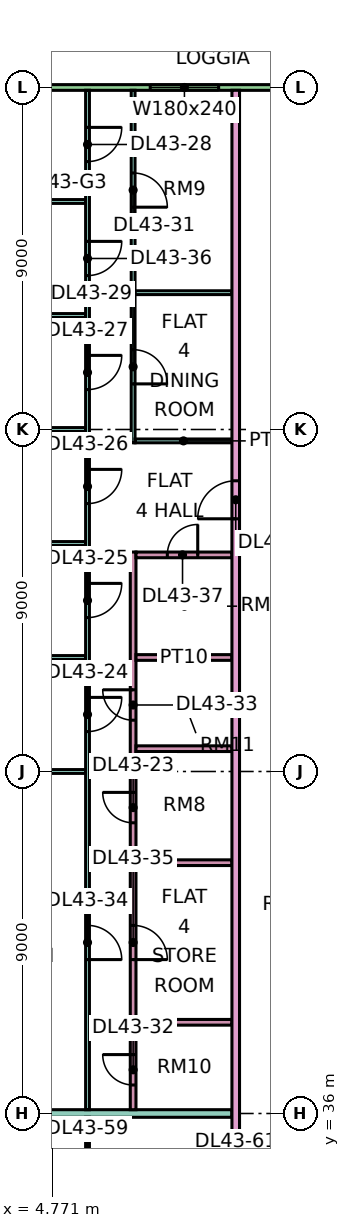
"""IFC4 building model, lengths in metres.
Left out: names, types, materials, properties, quantities, classifications, styles, units other than length and angle.
Written with IfcOpenShell. Run it as: python <this file> out.ifc"""

import sys

from ifc_helpers import new_model, si_unit, direction, frame, frame_2d, origin, place, context, subcontext, project, spatial, rectangle, extrude, element, fill, save


model = new_model("IFC4")
c1 = context("Model", 3, precision=1e-05, world=origin(), true_north=direction((0.0, 1.0)))
c2 = subcontext(c1, "Body", "Model", "MODEL_VIEW")
j1 = project(units=[si_unit("LENGTHUNIT", "METRE"), si_unit("PLANEANGLEUNIT", "RADIAN")], contexts=[c1])
p1 = place(None, origin())
s1 = spatial("IfcSite", under=j1, at=p1, CompositionType="ELEMENT")
p2 = place(p1, origin())
s2 = spatial("IfcBuilding", under=s1, at=p2, CompositionType="ELEMENT")
p3 = place(p2, frame((0.0, 0.0, 187.4)))
s3 = spatial("IfcBuildingStorey", under=s2, at=p3, CompositionType="ELEMENT", Elevation=187.4)
p4 = place(p3, frame((11.925, 63.0, 0.0), z_axis=(0.0, 0.0, 1.0), x_axis=(-1.0, 0.0, 0.0)))
e1 = element("IfcWall", 1, at=p4, inside=s3, PredefinedType="SOLIDWALL", context=c2, shape_type="SweptSolid", body=[
    extrude(rectangle(XDim=10.35, YDim=0.15, at=frame_2d((5.175, 0.0))), origin(), (0.0, 0.0, 1.0), 3.35),
])
p5 = place(p4, frame((2.775, 0.0, 0.45)))
e2 = element("IfcOpeningElement", 2, at=p5, cuts=e1, PredefinedType="OPENING", context=c2, shape_type="SweptSolid", body=[
    extrude(rectangle(XDim=1.8, YDim=2.4, at=frame_2d((0.9, 1.2))), frame((0.0, 0.085, 0.0), z_axis=(0.0, -1.0, 0.0), x_axis=(1.0, 0.0, 0.0)), (0.0, 0.0, 1.0), 0.17),
])
p6 = place(p4, frame((7.387, 0.0, 0.0)))
e3 = element("IfcOpeningElement", 3, at=p6, cuts=e1, PredefinedType="OPENING", context=c2, shape_type="SweptSolid", body=[
    extrude(rectangle(XDim=1.8, YDim=2.4, at=frame_2d((0.9, 1.2))), frame((0.0, 0.085, 0.0), z_axis=(0.0, -1.0, 0.0), x_axis=(1.0, 0.0, 0.0)), (0.0, 0.0, 1.0), 0.17),
])
p7 = place(p3, frame((0.0, 36.0, 0.0), z_axis=(0.0, 0.0, 1.0), x_axis=(1.0, 0.0, 0.0)))
e4 = element("IfcWall", 4, at=p7, inside=s3, PredefinedType="PARTITIONING", context=c2, shape_type="SweptSolid", body=[
    extrude(rectangle(XDim=9.5, YDim=0.2, at=frame_2d((4.75, 0.0))), origin(), (0.0, 0.0, 1.0), 3.35),
])
p8 = place(p3, frame((0.0, 45.0, 0.0), z_axis=(0.0, 0.0, 1.0), x_axis=(1.0, 0.0, 0.0)))
e5 = element("IfcWall", 5, at=p8, inside=s3, PredefinedType="PARTITIONING", context=c2, shape_type="SweptSolid", body=[
    extrude(rectangle(XDim=5.65, YDim=0.1, at=frame_2d((2.825, 0.0))), origin(), (0.0, 0.0, 1.0), 3.35),
])
p9 = place(p3, frame((0.0, 48.0, 0.0), z_axis=(0.0, 0.0, 1.0), x_axis=(1.0, 0.0, 0.0)))
e6 = element("IfcWall", 6, at=p9, inside=s3, PredefinedType="PARTITIONING", context=c2, shape_type="SweptSolid", body=[
    extrude(rectangle(XDim=5.65, YDim=0.1, at=frame_2d((2.825, 0.0))), origin(), (0.0, 0.0, 1.0), 3.35),
])
for number, where, z_axis, x_axis in (
    (7, (0.074, 51.0, 0.0), (0.0, 0.0, 1.0), (1.0, 0.0, 0.0)),
    (8, (0.074, 54.0, 0.0), (0.0, 0.0, 1.0), (1.0, 0.0, 0.0)),
    (9, (0.074, 57.0, 0.0), (0.0, 0.0, 1.0), (1.0, 0.0, 0.0)),
    (10, (0.074, 60.0, 0.0), (0.0, 0.0, 1.0), (1.0, 0.0, 0.0)),
):
    element("IfcWall", number, at=place(p3, frame(where, z_axis=z_axis, x_axis=x_axis)), inside=s3, PredefinedType="PARTITIONING", context=c2, shape_type="SweptSolid", body=[
        extrude(rectangle(XDim=5.576, YDim=0.1, at=frame_2d((2.788, 0.0))), origin(), (0.0, 0.0, 1.0), 3.35),
    ])
p10 = place(p3, frame((5.7, 29.95, 0.0), z_axis=(0.0, 0.0, 1.0), x_axis=(0.0, 1.0, 0.0)))
e11 = element("IfcWall", 11, at=p10, inside=s3, PredefinedType="PARTITIONING", context=c2, shape_type="SweptSolid", body=[
    extrude(rectangle(XDim=5.95, YDim=0.1, at=frame_2d((2.975, 0.0))), origin(), (0.0, 0.0, 1.0), 3.35),
])
p11 = place(p10, frame((1.1, 0.0, 0.0)))
e12 = element("IfcOpeningElement", 12, at=p11, cuts=e11, PredefinedType="OPENING", context=c2, shape_type="SweptSolid", body=[
    extrude(rectangle(XDim=0.9, YDim=2.1, at=frame_2d((0.45, 1.05))), frame((0.0, 0.06, 0.0), z_axis=(0.0, -1.0, 0.0), x_axis=(1.0, 0.0, 0.0)), (0.0, 0.0, 1.0), 0.12),
])
p12 = place(p10, frame((4.1, 0.0, 0.0)))
e13 = element("IfcOpeningElement", 13, at=p12, cuts=e11, PredefinedType="OPENING", context=c2, shape_type="SweptSolid", body=[
    extrude(rectangle(XDim=0.9, YDim=2.1, at=frame_2d((0.45, 1.05))), frame((0.0, 0.06, 0.0), z_axis=(0.0, -1.0, 0.0), x_axis=(1.0, 0.0, 0.0)), (0.0, 0.0, 1.0), 0.12),
])
p13 = place(p3, frame((5.7, 36.1, 0.0), z_axis=(0.0, 0.0, 1.0), x_axis=(0.0, 1.0, 0.0)))
e14 = element("IfcWall", 14, at=p13, inside=s3, PredefinedType="PARTITIONING", context=c2, shape_type="SweptSolid", body=[
    extrude(rectangle(XDim=26.826, YDim=0.1, at=frame_2d((13.413, 0.0))), origin(), (0.0, 0.0, 1.0), 3.35),
])
p14 = place(p13, frame((9.95, 0.0, 0.0)))
e15 = element("IfcOpeningElement", 15, at=p14, cuts=e14, PredefinedType="OPENING", context=c2, shape_type="SweptSolid", body=[
    extrude(rectangle(XDim=0.9, YDim=2.1, at=frame_2d((0.45, 1.05))), frame((0.0, 0.06, 0.0), z_axis=(0.0, -1.0, 0.0), x_axis=(1.0, 0.0, 0.0)), (0.0, 0.0, 1.0), 0.12),
])
p15 = place(p13, frame((12.95, 0.0, 0.0)))
e16 = element("IfcOpeningElement", 16, at=p15, cuts=e14, PredefinedType="OPENING", context=c2, shape_type="SweptSolid", body=[
    extrude(rectangle(XDim=0.9, YDim=2.1, at=frame_2d((0.45, 1.05))), frame((0.0, 0.06, 0.0), z_axis=(0.0, -1.0, 0.0), x_axis=(1.0, 0.0, 0.0)), (0.0, 0.0, 1.0), 0.12),
])
p16 = place(p13, frame((15.95, 0.0, 0.0)))
e17 = element("IfcOpeningElement", 17, at=p16, cuts=e14, PredefinedType="OPENING", context=c2, shape_type="SweptSolid", body=[
    extrude(rectangle(XDim=0.9, YDim=2.1, at=frame_2d((0.45, 1.05))), frame((0.0, 0.06, 0.0), z_axis=(0.0, -1.0, 0.0), x_axis=(1.0, 0.0, 0.0)), (0.0, 0.0, 1.0), 0.12),
])
p17 = place(p13, frame((18.95, 0.0, 0.0)))
e18 = element("IfcOpeningElement", 18, at=p17, cuts=e14, PredefinedType="OPENING", context=c2, shape_type="SweptSolid", body=[
    extrude(rectangle(XDim=0.9, YDim=2.1, at=frame_2d((0.45, 1.05))), frame((0.0, 0.06, 0.0), z_axis=(0.0, -1.0, 0.0), x_axis=(1.0, 0.0, 0.0)), (0.0, 0.0, 1.0), 0.12),
])
p18 = place(p13, frame((24.95, 0.0, 0.0)))
e19 = element("IfcOpeningElement", 19, at=p18, cuts=e14, PredefinedType="OPENING", context=c2, shape_type="SweptSolid", body=[
    extrude(rectangle(XDim=0.9, YDim=2.1, at=frame_2d((0.45, 1.05))), frame((0.0, 0.06, 0.0), z_axis=(0.0, -1.0, 0.0), x_axis=(1.0, 0.0, 0.0)), (0.0, 0.0, 1.0), 0.12),
])
p19 = place(p13, frame((3.95, 0.0, 0.0)))
e20 = element("IfcOpeningElement", 20, at=p19, cuts=e14, PredefinedType="OPENING", context=c2, shape_type="SweptSolid", body=[
    extrude(rectangle(XDim=0.9, YDim=2.1, at=frame_2d((0.45, 1.05))), frame((0.0, 0.06, 0.0), z_axis=(0.0, -1.0, 0.0), x_axis=(1.0, 0.0, 0.0)), (0.0, 0.0, 1.0), 0.12),
])
p20 = place(p13, frame((21.95, 0.0, 0.0)))
e21 = element("IfcOpeningElement", 21, at=p20, cuts=e14, PredefinedType="OPENING", context=c2, shape_type="SweptSolid", body=[
    extrude(rectangle(XDim=0.9, YDim=2.1, at=frame_2d((0.45, 1.05))), frame((0.0, 0.06, 0.0), z_axis=(0.0, -1.0, 0.0), x_axis=(1.0, 0.0, 0.0)), (0.0, 0.0, 1.0), 0.12),
])
p21 = place(p3, frame((6.9, 36.1, 0.0), z_axis=(0.0, 0.0, 1.0), x_axis=(0.0, 1.0, 0.0)))
e22 = element("IfcWall", 22, at=p21, inside=s3, PredefinedType="PARTITIONING", context=c2, shape_type="SweptSolid", body=[
    extrude(rectangle(XDim=14.675, YDim=0.15, at=frame_2d((7.337, 0.0))), origin(), (0.0, 0.0, 1.0), 3.35),
])
p22 = place(p21, frame((7.55, 0.0, 0.0)))
e23 = element("IfcOpeningElement", 23, at=p22, cuts=e22, PredefinedType="OPENING", context=c2, shape_type="SweptSolid", body=[
    extrude(rectangle(XDim=0.8, YDim=2.1, at=frame_2d((0.4, 1.05))), frame((0.0, 0.085, 0.0), z_axis=(0.0, -1.0, 0.0), x_axis=(1.0, 0.0, 0.0)), (0.0, 0.0, 1.0), 0.17),
])
p23 = place(p21, frame((0.65, 0.0, 0.0)))
e24 = element("IfcOpeningElement", 24, at=p23, cuts=e22, PredefinedType="OPENING", context=c2, shape_type="SweptSolid", body=[
    extrude(rectangle(XDim=0.8, YDim=2.1, at=frame_2d((0.4, 1.05))), frame((0.0, 0.085, 0.0), z_axis=(0.0, -1.0, 0.0), x_axis=(1.0, 0.0, 0.0)), (0.0, 0.0, 1.0), 0.17),
])
p24 = place(p21, frame((10.25, 0.0, 0.0)))
e25 = element("IfcOpeningElement", 25, at=p24, cuts=e22, PredefinedType="OPENING", context=c2, shape_type="SweptSolid", body=[
    extrude(rectangle(XDim=0.8, YDim=2.1, at=frame_2d((0.4, 1.05))), frame((0.0, 0.085, 0.0), z_axis=(0.0, -1.0, 0.0), x_axis=(1.0, 0.0, 0.0)), (0.0, 0.0, 1.0), 0.17),
])
p25 = place(p21, frame((3.95, 0.0, 0.0)))
e26 = element("IfcOpeningElement", 26, at=p25, cuts=e22, PredefinedType="OPENING", context=c2, shape_type="SweptSolid", body=[
    extrude(rectangle(XDim=0.9, YDim=2.1, at=frame_2d((0.45, 1.05))), frame((0.0, 0.085, 0.0), z_axis=(0.0, -1.0, 0.0), x_axis=(1.0, 0.0, 0.0)), (0.0, 0.0, 1.0), 0.17),
])
p26 = place(p3, frame((6.9, 53.65, 0.0), z_axis=(0.0, 0.0, 1.0), x_axis=(0.0, 1.0, 0.0)))
e27 = element("IfcWall", 27, at=p26, inside=s3, PredefinedType="PARTITIONING", context=c2, shape_type="SweptSolid", body=[
    extrude(rectangle(XDim=9.276, YDim=0.1, at=frame_2d((4.638, 0.0))), origin(), (0.0, 0.0, 1.0), 3.35),
])
p27 = place(p26, frame((1.55, 0.0, 0.0)))
e28 = element("IfcOpeningElement", 28, at=p27, cuts=e27, PredefinedType="OPENING", context=c2, shape_type="SweptSolid", body=[
    extrude(rectangle(XDim=0.9, YDim=2.1, at=frame_2d((0.45, 1.05))), frame((0.0, 0.06, 0.0), z_axis=(0.0, -1.0, 0.0), x_axis=(1.0, 0.0, 0.0)), (0.0, 0.0, 1.0), 0.12),
])
p28 = place(p26, frame((6.2, 0.0, 0.0)))
e29 = element("IfcOpeningElement", 29, at=p28, cuts=e27, PredefinedType="OPENING", context=c2, shape_type="SweptSolid", body=[
    extrude(rectangle(XDim=0.9, YDim=2.1, at=frame_2d((0.45, 1.05))), frame((0.0, 0.06, 0.0), z_axis=(0.0, -1.0, 0.0), x_axis=(1.0, 0.0, 0.0)), (0.0, 0.0, 1.0), 0.12),
])
for number, where, z_axis, x_axis in (
    (30, (6.95, 53.7, 0.0), (0.0, 0.0, 1.0), (1.0, 0.0, 0.0)),
    (31, (6.95, 57.6, 0.0), (0.0, 0.0, 1.0), (1.0, 0.0, 0.0)),
):
    element("IfcWall", number, at=place(p3, frame(where, z_axis=z_axis, x_axis=x_axis)), inside=s3, PredefinedType="PARTITIONING", context=c2, shape_type="SweptSolid", body=[
        extrude(rectangle(XDim=2.55, YDim=0.1, at=frame_2d((1.275, 0.0))), origin(), (0.0, 0.0, 1.0), 3.35),
    ])
for number, where, z_axis, x_axis in (
    (32, (6.975, 38.4, 0.0), (0.0, 0.0, 1.0), (1.0, 0.0, 0.0)),
    (33, (6.975, 42.6, 0.0), (0.0, 0.0, 1.0), (1.0, 0.0, 0.0)),
    (34, (6.975, 45.6, 0.0), (0.0, 0.0, 1.0), (1.0, 0.0, 0.0)),
    (35, (6.975, 48.0, 0.0), (0.0, 0.0, 1.0), (1.0, 0.0, 0.0)),
):
    element("IfcWall", number, at=place(p3, frame(where, z_axis=z_axis, x_axis=x_axis)), inside=s3, PredefinedType="PARTITIONING", context=c2, shape_type="SweptSolid", body=[
        extrude(rectangle(XDim=2.525, YDim=0.15, at=frame_2d((1.262, 0.0))), origin(), (0.0, 0.0, 1.0), 3.35),
    ])
p29 = place(p3, frame((6.975, 50.7, 0.0), z_axis=(0.0, 0.0, 1.0), x_axis=(1.0, 0.0, 0.0)))
e36 = element("IfcWall", 36, at=p29, inside=s3, PredefinedType="PARTITIONING", context=c2, shape_type="SweptSolid", body=[
    extrude(rectangle(XDim=2.525, YDim=0.15, at=frame_2d((1.262, 0.0))), origin(), (0.0, 0.0, 1.0), 3.35),
])
p30 = place(p29, frame((0.825, 0.0, 0.0)))
e37 = element("IfcOpeningElement", 37, at=p30, cuts=e36, PredefinedType="OPENING", context=c2, shape_type="SweptSolid", body=[
    extrude(rectangle(XDim=0.8, YDim=2.1, at=frame_2d((0.4, 1.05))), frame((0.0, 0.085, 0.0), z_axis=(0.0, -1.0, 0.0), x_axis=(1.0, 0.0, 0.0)), (0.0, 0.0, 1.0), 0.17),
])
p31 = place(p3, frame((9.6, 20.0, 0.0), z_axis=(0.0, 0.0, 1.0), x_axis=(0.0, 1.0, 0.0)))
e38 = element("IfcWall", 38, at=p31, inside=s3, PredefinedType="PARTITIONING", context=c2, shape_type="SweptSolid", body=[
    extrude(rectangle(XDim=42.926, YDim=0.2, at=frame_2d((21.463, 0.0))), origin(), (0.0, 0.0, 1.0), 3.35),
])
p32 = place(p31, frame((31.65, 0.0, 0.0)))
e39 = element("IfcOpeningElement", 39, at=p32, cuts=e38, PredefinedType="OPENING", context=c2, shape_type="SweptSolid", body=[
    extrude(rectangle(XDim=1.0, YDim=2.1, at=frame_2d((0.5, 1.05))), frame((0.0, 0.11, 0.0), z_axis=(0.0, -1.0, 0.0), x_axis=(1.0, 0.0, 0.0)), (0.0, 0.0, 1.0), 0.22),
])
p33 = place(p31, frame((0.6, 0.0, 0.0)))
e40 = element("IfcOpeningElement", 40, at=p33, cuts=e38, PredefinedType="OPENING", context=c2, shape_type="SweptSolid", body=[
    extrude(rectangle(XDim=1.2, YDim=2.1, at=frame_2d((0.6, 1.05))), frame((0.0, 0.11, 0.0), z_axis=(0.0, -1.0, 0.0), x_axis=(1.0, 0.0, 0.0)), (0.0, 0.0, 1.0), 0.22),
])
p34 = place(p31, frame((13.65, 0.0, 0.0)))
e41 = element("IfcOpeningElement", 41, at=p34, cuts=e38, PredefinedType="OPENING", context=c2, shape_type="SweptSolid", body=[
    extrude(rectangle(XDim=1.0, YDim=2.1, at=frame_2d((0.5, 1.05))), frame((0.0, 0.11, 0.0), z_axis=(0.0, -1.0, 0.0), x_axis=(1.0, 0.0, 0.0)), (0.0, 0.0, 1.0), 0.22),
])
p35 = place(p5, origin())
e42 = element("IfcWindow", 42, at=p35, inside=s3, PartitioningType="SINGLE_PANEL", PredefinedType="WINDOW", context=c2, shape_type="SweptSolid", body=[
    extrude(rectangle(XDim=1.8, YDim=2.4, at=frame_2d((0.9, 1.2))), frame((0.0, 0.03, 0.0), z_axis=(0.0, -1.0, 0.0), x_axis=(1.0, 0.0, 0.0)), (0.0, 0.0, 1.0), 0.06),
])
fill(e2, e42)
p36 = place(p22, frame((0.8, 0.0, 0.0), z_axis=(0.0, 0.0, 1.0), x_axis=(-1.0, 0.0, 0.0)))
e43 = element("IfcDoor", 43, at=p36, inside=s3, OperationType="SINGLE_SWING_RIGHT", PredefinedType="DOOR", context=c2, shape_type="SweptSolid", body=[
    extrude(rectangle(XDim=0.8, YDim=2.1, at=frame_2d((0.4, 1.05))), frame((0.0, 0.025, 0.0), z_axis=(0.0, -1.0, 0.0), x_axis=(1.0, 0.0, 0.0)), (0.0, 0.0, 1.0), 0.05),
])
fill(e23, e43)
p37 = place(p14, origin())
e44 = element("IfcDoor", 44, at=p37, inside=s3, OperationType="SINGLE_SWING_RIGHT", PredefinedType="DOOR", context=c2, shape_type="SweptSolid", body=[
    extrude(rectangle(XDim=0.9, YDim=2.1, at=frame_2d((0.45, 1.05))), frame((0.0, 0.025, 0.0), z_axis=(0.0, -1.0, 0.0), x_axis=(1.0, 0.0, 0.0)), (0.0, 0.0, 1.0), 0.05),
])
fill(e15, e44)
p38 = place(p15, origin())
e45 = element("IfcDoor", 45, at=p38, inside=s3, OperationType="SINGLE_SWING_RIGHT", PredefinedType="DOOR", context=c2, shape_type="SweptSolid", body=[
    extrude(rectangle(XDim=0.9, YDim=2.1, at=frame_2d((0.45, 1.05))), frame((0.0, 0.025, 0.0), z_axis=(0.0, -1.0, 0.0), x_axis=(1.0, 0.0, 0.0)), (0.0, 0.0, 1.0), 0.05),
])
fill(e16, e45)
p39 = place(p16, origin())
e46 = element("IfcDoor", 46, at=p39, inside=s3, OperationType="SINGLE_SWING_RIGHT", PredefinedType="DOOR", context=c2, shape_type="SweptSolid", body=[
    extrude(rectangle(XDim=0.9, YDim=2.1, at=frame_2d((0.45, 1.05))), frame((0.0, 0.025, 0.0), z_axis=(0.0, -1.0, 0.0), x_axis=(1.0, 0.0, 0.0)), (0.0, 0.0, 1.0), 0.05),
])
fill(e17, e46)
p40 = place(p17, origin())
e47 = element("IfcDoor", 47, at=p40, inside=s3, OperationType="SINGLE_SWING_RIGHT", PredefinedType="DOOR", context=c2, shape_type="SweptSolid", body=[
    extrude(rectangle(XDim=0.9, YDim=2.1, at=frame_2d((0.45, 1.05))), frame((0.0, 0.025, 0.0), z_axis=(0.0, -1.0, 0.0), x_axis=(1.0, 0.0, 0.0)), (0.0, 0.0, 1.0), 0.05),
])
fill(e18, e47)
p41 = place(p18, origin())
e48 = element("IfcDoor", 48, at=p41, inside=s3, OperationType="SINGLE_SWING_RIGHT", PredefinedType="DOOR", context=c2, shape_type="SweptSolid", body=[
    extrude(rectangle(XDim=0.9, YDim=2.1, at=frame_2d((0.45, 1.05))), frame((0.0, 0.025, 0.0), z_axis=(0.0, -1.0, 0.0), x_axis=(1.0, 0.0, 0.0)), (0.0, 0.0, 1.0), 0.05),
])
fill(e19, e48)
p42 = place(p27, frame((0.9, 0.0, 0.0), z_axis=(0.0, 0.0, 1.0), x_axis=(-1.0, 0.0, 0.0)))
e49 = element("IfcDoor", 49, at=p42, inside=s3, OperationType="SINGLE_SWING_LEFT", PredefinedType="DOOR", context=c2, shape_type="SweptSolid", body=[
    extrude(rectangle(XDim=0.9, YDim=2.1, at=frame_2d((0.45, 1.05))), frame((0.0, 0.025, 0.0), z_axis=(0.0, -1.0, 0.0), x_axis=(1.0, 0.0, 0.0)), (0.0, 0.0, 1.0), 0.05),
])
fill(e28, e49)
p43 = place(p32, origin())
e50 = element("IfcDoor", 50, at=p43, inside=s3, OperationType="SINGLE_SWING_LEFT", PredefinedType="DOOR", context=c2, shape_type="SweptSolid", body=[
    extrude(rectangle(XDim=1.0, YDim=2.1, at=frame_2d((0.5, 1.05))), frame((0.0, 0.025, 0.0), z_axis=(0.0, -1.0, 0.0), x_axis=(1.0, 0.0, 0.0)), (0.0, 0.0, 1.0), 0.05),
])
fill(e39, e50)
p44 = place(p28, frame((0.9, 0.0, 0.0), z_axis=(0.0, 0.0, 1.0), x_axis=(-1.0, 0.0, 0.0)))
e51 = element("IfcDoor", 51, at=p44, inside=s3, OperationType="SINGLE_SWING_LEFT", PredefinedType="DOOR", context=c2, shape_type="SweptSolid", body=[
    extrude(rectangle(XDim=0.9, YDim=2.1, at=frame_2d((0.45, 1.05))), frame((0.0, 0.025, 0.0), z_axis=(0.0, -1.0, 0.0), x_axis=(1.0, 0.0, 0.0)), (0.0, 0.0, 1.0), 0.05),
])
fill(e29, e51)
p45 = place(p23, frame((0.8, 0.0, 0.0), z_axis=(0.0, 0.0, 1.0), x_axis=(-1.0, 0.0, 0.0)))
e52 = element("IfcDoor", 52, at=p45, inside=s3, OperationType="SINGLE_SWING_RIGHT", PredefinedType="DOOR", context=c2, shape_type="SweptSolid", body=[
    extrude(rectangle(XDim=0.8, YDim=2.1, at=frame_2d((0.4, 1.05))), frame((0.0, 0.025, 0.0), z_axis=(0.0, -1.0, 0.0), x_axis=(1.0, 0.0, 0.0)), (0.0, 0.0, 1.0), 0.05),
])
fill(e24, e52)
p46 = place(p24, frame((0.8, 0.0, 0.0), z_axis=(0.0, 0.0, 1.0), x_axis=(-1.0, 0.0, 0.0)))
e53 = element("IfcDoor", 53, at=p46, inside=s3, OperationType="SINGLE_SWING_RIGHT", PredefinedType="DOOR", context=c2, shape_type="SweptSolid", body=[
    extrude(rectangle(XDim=0.8, YDim=2.1, at=frame_2d((0.4, 1.05))), frame((0.0, 0.025, 0.0), z_axis=(0.0, -1.0, 0.0), x_axis=(1.0, 0.0, 0.0)), (0.0, 0.0, 1.0), 0.05),
])
fill(e25, e53)
p47 = place(p19, frame((0.9, 0.0, 0.0), z_axis=(0.0, 0.0, 1.0), x_axis=(-1.0, 0.0, 0.0)))
e54 = element("IfcDoor", 54, at=p47, inside=s3, OperationType="SINGLE_SWING_LEFT", PredefinedType="DOOR", context=c2, shape_type="SweptSolid", body=[
    extrude(rectangle(XDim=0.9, YDim=2.1, at=frame_2d((0.45, 1.05))), frame((0.0, 0.025, 0.0), z_axis=(0.0, -1.0, 0.0), x_axis=(1.0, 0.0, 0.0)), (0.0, 0.0, 1.0), 0.05),
])
fill(e20, e54)
p48 = place(p25, frame((0.9, 0.0, 0.0), z_axis=(0.0, 0.0, 1.0), x_axis=(-1.0, 0.0, 0.0)))
e55 = element("IfcDoor", 55, at=p48, inside=s3, OperationType="SINGLE_SWING_LEFT", PredefinedType="DOOR", context=c2, shape_type="SweptSolid", body=[
    extrude(rectangle(XDim=0.9, YDim=2.1, at=frame_2d((0.45, 1.05))), frame((0.0, 0.025, 0.0), z_axis=(0.0, -1.0, 0.0), x_axis=(1.0, 0.0, 0.0)), (0.0, 0.0, 1.0), 0.05),
])
fill(e26, e55)
p49 = place(p20, origin())
e56 = element("IfcDoor", 56, at=p49, inside=s3, OperationType="SINGLE_SWING_RIGHT", PredefinedType="DOOR", context=c2, shape_type="SweptSolid", body=[
    extrude(rectangle(XDim=0.9, YDim=2.1, at=frame_2d((0.45, 1.05))), frame((0.0, 0.025, 0.0), z_axis=(0.0, -1.0, 0.0), x_axis=(1.0, 0.0, 0.0)), (0.0, 0.0, 1.0), 0.05),
])
fill(e21, e56)
p50 = place(p30, frame((0.8, 0.0, 0.0), z_axis=(0.0, 0.0, 1.0), x_axis=(-1.0, 0.0, 0.0)))
e57 = element("IfcDoor", 57, at=p50, inside=s3, OperationType="SINGLE_SWING_RIGHT", PredefinedType="DOOR", context=c2, shape_type="SweptSolid", body=[
    extrude(rectangle(XDim=0.8, YDim=2.1, at=frame_2d((0.4, 1.05))), frame((0.0, 0.025, 0.0), z_axis=(0.0, -1.0, 0.0), x_axis=(1.0, 0.0, 0.0)), (0.0, 0.0, 1.0), 0.05),
])
fill(e37, e57)
save(model, sys.argv[1])
